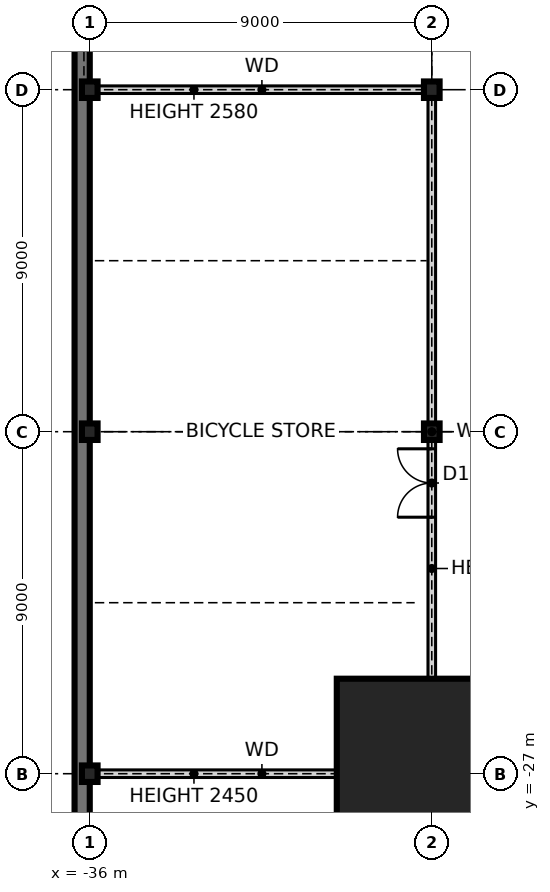
"""IFC4 building model, lengths in metres.
Left out: names, types, materials, properties, quantities, classifications, styles, units other than length and angle.
Written with IfcOpenShell. Run it as: python <this file> out.ifc"""

import sys

from ifc_helpers import new_model, si_unit, direction, frame, frame_2d, origin, origin_2d, place, context, subcontext, project, spatial, rectangle, i_section, extrude, element, fill, save


model = new_model("IFC4")
c1 = context("Model", 3, precision=1e-05, world=origin(), true_north=direction((0.0, 1.0)))
c2 = subcontext(c1, "Body", "Model", "MODEL_VIEW")
j1 = project(units=[si_unit("LENGTHUNIT", "METRE"), si_unit("PLANEANGLEUNIT", "RADIAN")], contexts=[c1])
p1 = place(None, origin())
s1 = spatial("IfcSite", under=j1, at=p1, CompositionType="ELEMENT")
p2 = place(p1, origin())
s2 = spatial("IfcBuilding", under=s1, at=p2, CompositionType="ELEMENT")
p3 = place(p2, frame((0.0, 0.0, -3.6)))
s3 = spatial("IfcBuildingStorey", under=s2, at=p3, CompositionType="ELEMENT", Elevation=-3.6)
p4 = place(p3, frame((-27.0, -27.0, 0.0), z_axis=(0.0, 0.0, 1.0), x_axis=(1.0, 0.0, 0.0)))
e1 = element("IfcColumn", 1, at=p4, inside=s3, PredefinedType="COLUMN", context=c2, shape_type="SweptSolid", body=[
    extrude(rectangle(XDim=5.0, YDim=5.0, at=origin_2d()), origin(), (0.0, 0.0, 1.0), 3.6),
    extrude(i_section(OverallWidth=0.478, OverallDepth=0.599, WebThickness=0.1, FlangeThickness=0.14, at=origin_2d()), origin(), (0.0, 0.0, 1.0), 3.6),
])
for number, where, z_axis, x_axis in (
    (2, (-36.0, -27.0, 0.0), (0.0, 0.0, 1.0), (1.0, 0.0, 0.0)),
    (3, (-36.0, -18.0, 0.0), (0.0, 0.0, 1.0), (1.0, 0.0, 0.0)),
    (4, (-36.0, -9.0, 0.0), (0.0, 0.0, 1.0), (1.0, 0.0, 0.0)),
    (5, (-27.0, -18.0, 0.0), (0.0, 0.0, 1.0), (1.0, 0.0, 0.0)),
    (6, (-27.0, -9.0, 0.0), (0.0, 0.0, 1.0), (1.0, 0.0, 0.0)),
):
    element("IfcColumn", number, at=place(p3, frame(where, z_axis=z_axis, x_axis=x_axis)), inside=s3, PredefinedType="COLUMN", context=c2, shape_type="SweptSolid", body=[
        extrude(i_section(OverallWidth=0.411, OverallDepth=0.434, WebThickness=0.036, FlangeThickness=0.057, at=origin_2d()), origin(), (0.0, 0.0, 1.0), 3.6),
    ])
p5 = place(p3, frame((-36.2, 35.8, 0.0), z_axis=(0.0, 0.0, 1.0), x_axis=(0.0, -1.0, 0.0)))
e7 = element("IfcWall", 7, at=p5, inside=s3, PredefinedType="SOLIDWALL", context=c2, shape_type="SweptSolid", body=[
    extrude(rectangle(XDim=71.6, YDim=0.4, at=frame_2d((35.8, 0.0))), origin(), (0.0, 0.0, 1.0), 2.581),
])
p6 = place(p3, frame((-35.94, -27.0, 0.0), z_axis=(0.0, 0.0, 1.0), x_axis=(1.0, 0.0, 0.0)))
e8 = element("IfcWall", 8, at=p6, inside=s3, PredefinedType="SOLIDWALL", context=c2, shape_type="SweptSolid", body=[
    extrude(rectangle(XDim=8.94, YDim=0.2, at=frame_2d((4.47, 0.0))), origin(), (0.0, 0.0, 1.0), 2.45),
])
p7 = place(p3, frame((-35.94, -9.0, 0.0), z_axis=(0.0, 0.0, 1.0), x_axis=(1.0, 0.0, 0.0)))
e9 = element("IfcWall", 9, at=p7, inside=s3, PredefinedType="SOLIDWALL", context=c2, shape_type="SweptSolid", body=[
    extrude(rectangle(XDim=8.94, YDim=0.2, at=frame_2d((4.47, 0.0))), origin(), (0.0, 0.0, 1.0), 2.581),
])
p8 = place(p3, frame((-27.0, -27.0, 0.0), z_axis=(0.0, 0.0, 1.0), x_axis=(0.0, 1.0, 0.0)))
e10 = element("IfcWall", 10, at=p8, inside=s3, PredefinedType="SOLIDWALL", context=c2, shape_type="SweptSolid", body=[
    extrude(rectangle(XDim=18.0, YDim=0.2, at=frame_2d((9.0, 0.0))), origin(), (0.0, 0.0, 1.0), 2.45),
])
p9 = place(p8, frame((6.75, 0.0, 0.0)))
e11 = element("IfcOpeningElement", 11, at=p9, cuts=e10, PredefinedType="OPENING", context=c2, shape_type="SweptSolid", body=[
    extrude(rectangle(XDim=1.8, YDim=2.4, at=frame_2d((0.9, 1.2))), frame((0.0, 0.11, 0.0), z_axis=(0.0, -1.0, 0.0), x_axis=(1.0, 0.0, 0.0)), (0.0, 0.0, 1.0), 0.22),
])
p10 = place(p9, origin())
e12 = element("IfcDoor", 12, at=p10, inside=s3, OperationType="DOUBLE_DOOR_SINGLE_SWING", PredefinedType="DOOR", context=c2, shape_type="SweptSolid", body=[
    extrude(rectangle(XDim=1.8, YDim=2.4, at=frame_2d((0.9, 1.2))), frame((0.0, 0.025, 0.0), z_axis=(0.0, -1.0, 0.0), x_axis=(1.0, 0.0, 0.0)), (0.0, 0.0, 1.0), 0.05),
])
fill(e11, e12)
save(model, sys.argv[1])
